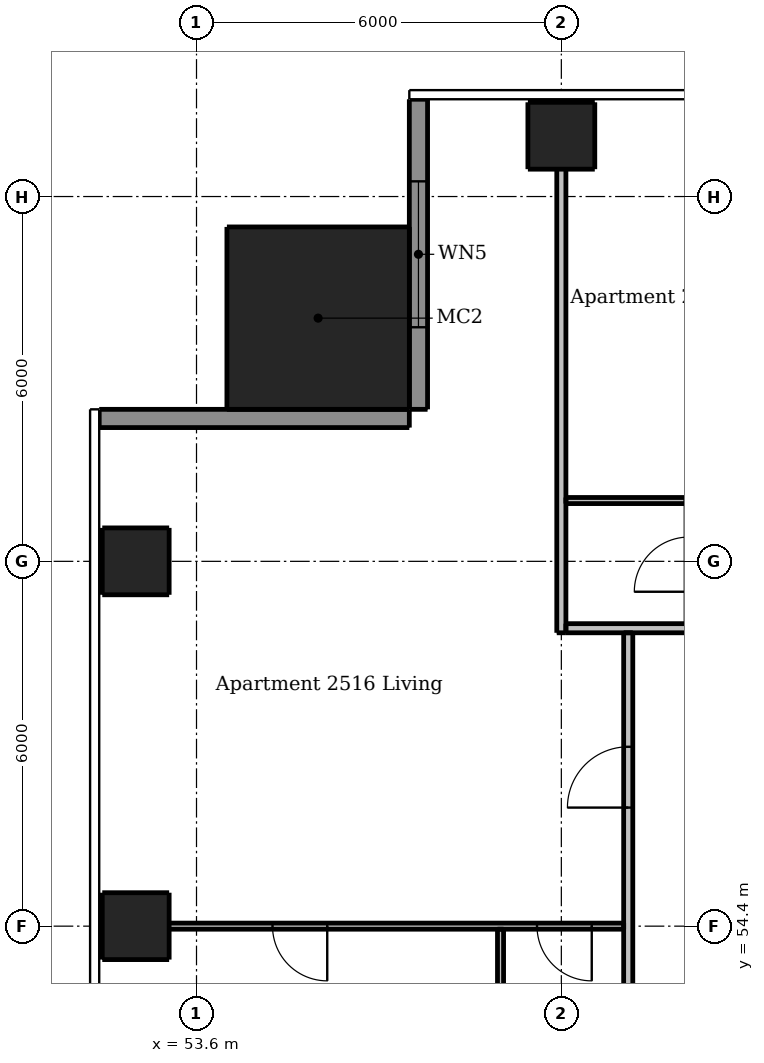
"""IFC4 building model, lengths in metres.
Left out: names, types, materials, properties, quantities, classifications, styles, units other than length and angle.
Written with IfcOpenShell. Run it as: python <this file> out.ifc"""

import sys

from ifc_helpers import new_model, si_unit, direction, frame, frame_2d, origin, origin_2d, place, context, subcontext, project, spatial, rectangle, extrude, element, fill, save


model = new_model("IFC4")
c1 = context("Model", 3, precision=1e-05, world=origin(), true_north=direction((0.0, 1.0)))
c2 = subcontext(c1, "Body", "Model", "MODEL_VIEW")
j1 = project(units=[si_unit("LENGTHUNIT", "METRE"), si_unit("PLANEANGLEUNIT", "RADIAN")], contexts=[c1])
p1 = place(None, origin())
s1 = spatial("IfcSite", under=j1, at=p1, CompositionType="ELEMENT")
p2 = place(p1, origin())
s2 = spatial("IfcBuilding", under=s1, at=p2, CompositionType="ELEMENT")
p3 = place(p2, frame((0.0, 0.0, 95.2)))
s3 = spatial("IfcBuildingStorey", under=s2, at=p3, CompositionType="ELEMENT", Elevation=95.2)
for number, where, z_axis, x_axis in (
    (1, (59.6, 67.4, 0.0), (0.0, 0.0, 1.0), (1.0, 0.0, 0.0)),
    (2, (52.6, 54.4, 0.0), (0.0, 0.0, 1.0), (1.0, 0.0, 0.0)),
    (3, (52.6, 60.4, 0.0), (0.0, 0.0, 1.0), (1.0, 0.0, 0.0)),
):
    element("IfcColumn", number, at=place(p3, frame(where, z_axis=z_axis, x_axis=x_axis)), inside=s3, PredefinedType="COLUMN", context=c2, shape_type="SweptSolid", body=[
        extrude(rectangle(XDim=1.1, YDim=1.1, at=origin_2d()), origin(), (0.0, 0.0, 1.0), 3.05),
    ])
p4 = place(p3, frame((55.6, 64.4, 0.0), z_axis=(0.0, 0.0, 1.0), x_axis=(1.0, 0.0, 0.0)))
e4 = element("IfcColumn", 4, at=p4, inside=s3, PredefinedType="COLUMN", context=c2, shape_type="SweptSolid", body=[
    extrude(rectangle(XDim=3.0, YDim=3.0, at=origin_2d()), origin(), (0.0, 0.0, 1.0), 3.3),
])
p5 = place(p3, frame((57.25, 68.0, 0.0), z_axis=(0.0, 0.0, 1.0), x_axis=(0.0, -1.0, 0.0)))
e5 = element("IfcWall", 5, at=p5, inside=s3, PredefinedType="SOLIDWALL", context=c2, shape_type="SweptSolid", body=[
    extrude(rectangle(XDim=5.1, YDim=0.3, at=frame_2d((2.55, 0.0))), origin(), (0.0, 0.0, 1.0), 3.05),
])
p6 = place(p5, frame((1.35, 0.0, 0.15)))
e6 = element("IfcOpeningElement", 6, at=p6, cuts=e5, PredefinedType="OPENING", context=c2, shape_type="SweptSolid", body=[
    extrude(rectangle(XDim=2.4, YDim=2.1, at=frame_2d((1.2, 1.05))), frame((0.0, 0.16, 0.0), z_axis=(0.0, -1.0, 0.0), x_axis=(1.0, 0.0, 0.0)), (0.0, 0.0, 1.0), 0.32),
])
p7 = place(p3, frame((57.1, 62.75, 0.0), z_axis=(0.0, 0.0, 1.0), x_axis=(-1.0, 0.0, 0.0)))
e7 = element("IfcWall", 7, at=p7, inside=s3, PredefinedType="SOLIDWALL", context=c2, shape_type="SweptSolid", body=[
    extrude(rectangle(XDim=5.1, YDim=0.3, at=frame_2d((2.55, 0.0))), origin(), (0.0, 0.0, 1.0), 3.05),
])
p8 = place(p3, frame((58.6, 54.35, 0.0), z_axis=(0.0, 0.0, 1.0), x_axis=(0.0, -1.0, 0.0)))
e8 = element("IfcWall", 8, at=p8, inside=s3, PredefinedType="PARTITIONING", context=c2, shape_type="SweptSolid", body=[
    extrude(rectangle(XDim=8.1, YDim=0.1, at=frame_2d((4.05, 0.0))), origin(), (0.0, 0.0, 1.0), 3.05),
])
p9 = place(p8, frame((3.75, 0.0, 0.0)))
e9 = element("IfcOpeningElement", 9, at=p9, cuts=e8, PredefinedType="OPENING", context=c2, shape_type="SweptSolid", body=[
    extrude(rectangle(XDim=0.8, YDim=2.1, at=frame_2d((0.4, 1.05))), frame((0.0, 0.06, 0.0), z_axis=(0.0, -1.0, 0.0), x_axis=(1.0, 0.0, 0.0)), (0.0, 0.0, 1.0), 0.12),
])
p10 = place(p3, frame((59.675, 61.4, 0.0), z_axis=(0.0, 0.0, 1.0), x_axis=(1.0, 0.0, 0.0)))
e10 = element("IfcWall", 10, at=p10, inside=s3, PredefinedType="PARTITIONING", context=c2, shape_type="SweptSolid", body=[
    extrude(rectangle(XDim=1.975, YDim=0.1, at=frame_2d((0.987, 0.0))), origin(), (0.0, 0.0, 1.0), 3.05),
])
p11 = place(p3, frame((60.625, 54.4, 0.0), z_axis=(0.0, 0.0, 1.0), x_axis=(-1.0, 0.0, 0.0)))
e11 = element("IfcWall", 11, at=p11, inside=s3, PredefinedType="PARTITIONING", context=c2, shape_type="SweptSolid", body=[
    extrude(rectangle(XDim=8.625, YDim=0.1, at=frame_2d((4.312, 0.0))), origin(), (0.0, 0.0, 1.0), 2.516),
])
p12 = place(p11, frame((0.525, 0.0, 0.0)))
e12 = element("IfcOpeningElement", 12, at=p12, cuts=e11, PredefinedType="OPENING", context=c2, shape_type="SweptSolid", body=[
    extrude(rectangle(XDim=0.9, YDim=2.1, at=frame_2d((0.45, 1.05))), frame((0.0, 0.06, 0.0), z_axis=(0.0, -1.0, 0.0), x_axis=(1.0, 0.0, 0.0)), (0.0, 0.0, 1.0), 0.12),
])
p13 = place(p11, frame((4.875, 0.0, 0.0)))
e13 = element("IfcOpeningElement", 13, at=p13, cuts=e11, PredefinedType="OPENING", context=c2, shape_type="SweptSolid", body=[
    extrude(rectangle(XDim=0.9, YDim=2.1, at=frame_2d((0.45, 1.05))), frame((0.0, 0.06, 0.0), z_axis=(0.0, -1.0, 0.0), x_axis=(1.0, 0.0, 0.0)), (0.0, 0.0, 1.0), 0.12),
])
p14 = place(p3, frame((59.6, 59.225, 0.0), z_axis=(0.0, 0.0, 1.0), x_axis=(0.0, 1.0, 0.0)))
e14 = element("IfcWall", 14, at=p14, inside=s3, PredefinedType="PARTITIONING", context=c2, shape_type="SweptSolid", body=[
    extrude(rectangle(XDim=8.775, YDim=0.15, at=frame_2d((4.387, 0.0))), origin(), (0.0, 0.0, 1.0), 2.51),
])
p15 = place(p3, frame((60.7, 30.325, 0.0), z_axis=(0.0, 0.0, 1.0), x_axis=(0.0, 1.0, 0.0)))
e15 = element("IfcWall", 15, at=p15, inside=s3, PredefinedType="PARTITIONING", context=c2, shape_type="SweptSolid", body=[
    extrude(rectangle(XDim=28.9, YDim=0.15, at=frame_2d((14.45, 0.0))), origin(), (0.0, 0.0, 1.0), 3.05),
])
p16 = place(p15, frame((2.575, 0.0, 0.0)))
e16 = element("IfcOpeningElement", 16, at=p16, cuts=e15, PredefinedType="OPENING", context=c2, shape_type="SweptSolid", body=[
    extrude(rectangle(XDim=1.0, YDim=2.1, at=frame_2d((0.5, 1.05))), frame((0.0, 0.085, 0.0), z_axis=(0.0, -1.0, 0.0), x_axis=(1.0, 0.0, 0.0)), (0.0, 0.0, 1.0), 0.17),
])
p17 = place(p15, frame((8.575, 0.0, 0.0)))
e17 = element("IfcOpeningElement", 17, at=p17, cuts=e15, PredefinedType="OPENING", context=c2, shape_type="SweptSolid", body=[
    extrude(rectangle(XDim=1.0, YDim=2.1, at=frame_2d((0.5, 1.05))), frame((0.0, 0.085, 0.0), z_axis=(0.0, -1.0, 0.0), x_axis=(1.0, 0.0, 0.0)), (0.0, 0.0, 1.0), 0.17),
])
p18 = place(p15, frame((14.575, 0.0, 0.0)))
e18 = element("IfcOpeningElement", 18, at=p18, cuts=e15, PredefinedType="OPENING", context=c2, shape_type="SweptSolid", body=[
    extrude(rectangle(XDim=1.0, YDim=2.1, at=frame_2d((0.5, 1.05))), frame((0.0, 0.085, 0.0), z_axis=(0.0, -1.0, 0.0), x_axis=(1.0, 0.0, 0.0)), (0.0, 0.0, 1.0), 0.17),
])
p19 = place(p15, frame((26.025, 0.0, 0.0)))
e19 = element("IfcOpeningElement", 19, at=p19, cuts=e15, PredefinedType="OPENING", context=c2, shape_type="SweptSolid", body=[
    extrude(rectangle(XDim=1.0, YDim=2.1, at=frame_2d((0.5, 1.05))), frame((0.0, 0.085, 0.0), z_axis=(0.0, -1.0, 0.0), x_axis=(1.0, 0.0, 0.0)), (0.0, 0.0, 1.0), 0.17),
])
p20 = place(p3, frame((59.675, 59.3, 0.0), z_axis=(0.0, 0.0, 1.0), x_axis=(1.0, 0.0, 0.0)))
e20 = element("IfcWall", 20, at=p20, inside=s3, PredefinedType="PARTITIONING", context=c2, shape_type="SweptSolid", body=[
    extrude(rectangle(XDim=28.55, YDim=0.15, at=frame_2d((14.275, 0.0))), origin(), (0.0, 0.0, 1.0), 3.05),
])
p21 = place(p20, frame((2.425, 0.0, 0.0)))
e21 = element("IfcOpeningElement", 21, at=p21, cuts=e20, PredefinedType="OPENING", context=c2, shape_type="SweptSolid", body=[
    extrude(rectangle(XDim=1.0, YDim=2.1, at=frame_2d((0.5, 1.05))), frame((0.0, 0.085, 0.0), z_axis=(0.0, -1.0, 0.0), x_axis=(1.0, 0.0, 0.0)), (0.0, 0.0, 1.0), 0.17),
])
p22 = place(p20, frame((8.425, 0.0, 0.0)))
e22 = element("IfcOpeningElement", 22, at=p22, cuts=e20, PredefinedType="OPENING", context=c2, shape_type="SweptSolid", body=[
    extrude(rectangle(XDim=1.0, YDim=2.1, at=frame_2d((0.5, 1.05))), frame((0.0, 0.085, 0.0), z_axis=(0.0, -1.0, 0.0), x_axis=(1.0, 0.0, 0.0)), (0.0, 0.0, 1.0), 0.17),
])
p23 = place(p20, frame((14.425, 0.0, 0.0)))
e23 = element("IfcOpeningElement", 23, at=p23, cuts=e20, PredefinedType="OPENING", context=c2, shape_type="SweptSolid", body=[
    extrude(rectangle(XDim=1.0, YDim=2.1, at=frame_2d((0.5, 1.05))), frame((0.0, 0.085, 0.0), z_axis=(0.0, -1.0, 0.0), x_axis=(1.0, 0.0, 0.0)), (0.0, 0.0, 1.0), 0.17),
])
p24 = place(p20, frame((25.775, 0.0, 0.0)))
e24 = element("IfcOpeningElement", 24, at=p24, cuts=e20, PredefinedType="OPENING", context=c2, shape_type="SweptSolid", body=[
    extrude(rectangle(XDim=1.0, YDim=2.1, at=frame_2d((0.5, 1.05))), frame((0.0, 0.085, 0.0), z_axis=(0.0, -1.0, 0.0), x_axis=(1.0, 0.0, 0.0)), (0.0, 0.0, 1.0), 0.17),
])
p25 = place(p6, origin())
e25 = element("IfcWindow", 25, at=p25, inside=s3, PartitioningType="DOUBLE_PANEL_VERTICAL", PredefinedType="WINDOW", context=c2, shape_type="SweptSolid", body=[
    extrude(rectangle(XDim=2.4, YDim=2.1, at=frame_2d((1.2, 1.05))), frame((0.0, 0.03, 0.0), z_axis=(0.0, -1.0, 0.0), x_axis=(1.0, 0.0, 0.0)), (0.0, 0.0, 1.0), 0.06),
])
fill(e6, e25)
p26 = place(p19, origin())
e26 = element("IfcDoor", 26, at=p26, inside=s3, OperationType="SINGLE_SWING_LEFT", PredefinedType="DOOR", context=c2, shape_type="SweptSolid", body=[
    extrude(rectangle(XDim=1.0, YDim=2.1, at=frame_2d((0.5, 1.05))), frame((0.0, 0.025, 0.0), z_axis=(0.0, -1.0, 0.0), x_axis=(1.0, 0.0, 0.0)), (0.0, 0.0, 1.0), 0.05),
])
fill(e19, e26)
p27 = place(p12, origin())
e27 = element("IfcDoor", 27, at=p27, inside=s3, OperationType="SINGLE_SWING_LEFT", PredefinedType="DOOR", context=c2, shape_type="SweptSolid", body=[
    extrude(rectangle(XDim=0.9, YDim=2.1, at=frame_2d((0.45, 1.05))), frame((0.0, 0.025, 0.0), z_axis=(0.0, -1.0, 0.0), x_axis=(1.0, 0.0, 0.0)), (0.0, 0.0, 1.0), 0.05),
])
fill(e12, e27)
p28 = place(p13, origin())
e28 = element("IfcDoor", 28, at=p28, inside=s3, OperationType="SINGLE_SWING_LEFT", PredefinedType="DOOR", context=c2, shape_type="SweptSolid", body=[
    extrude(rectangle(XDim=0.9, YDim=2.1, at=frame_2d((0.45, 1.05))), frame((0.0, 0.025, 0.0), z_axis=(0.0, -1.0, 0.0), x_axis=(1.0, 0.0, 0.0)), (0.0, 0.0, 1.0), 0.05),
])
fill(e13, e28)
save(model, sys.argv[1])
